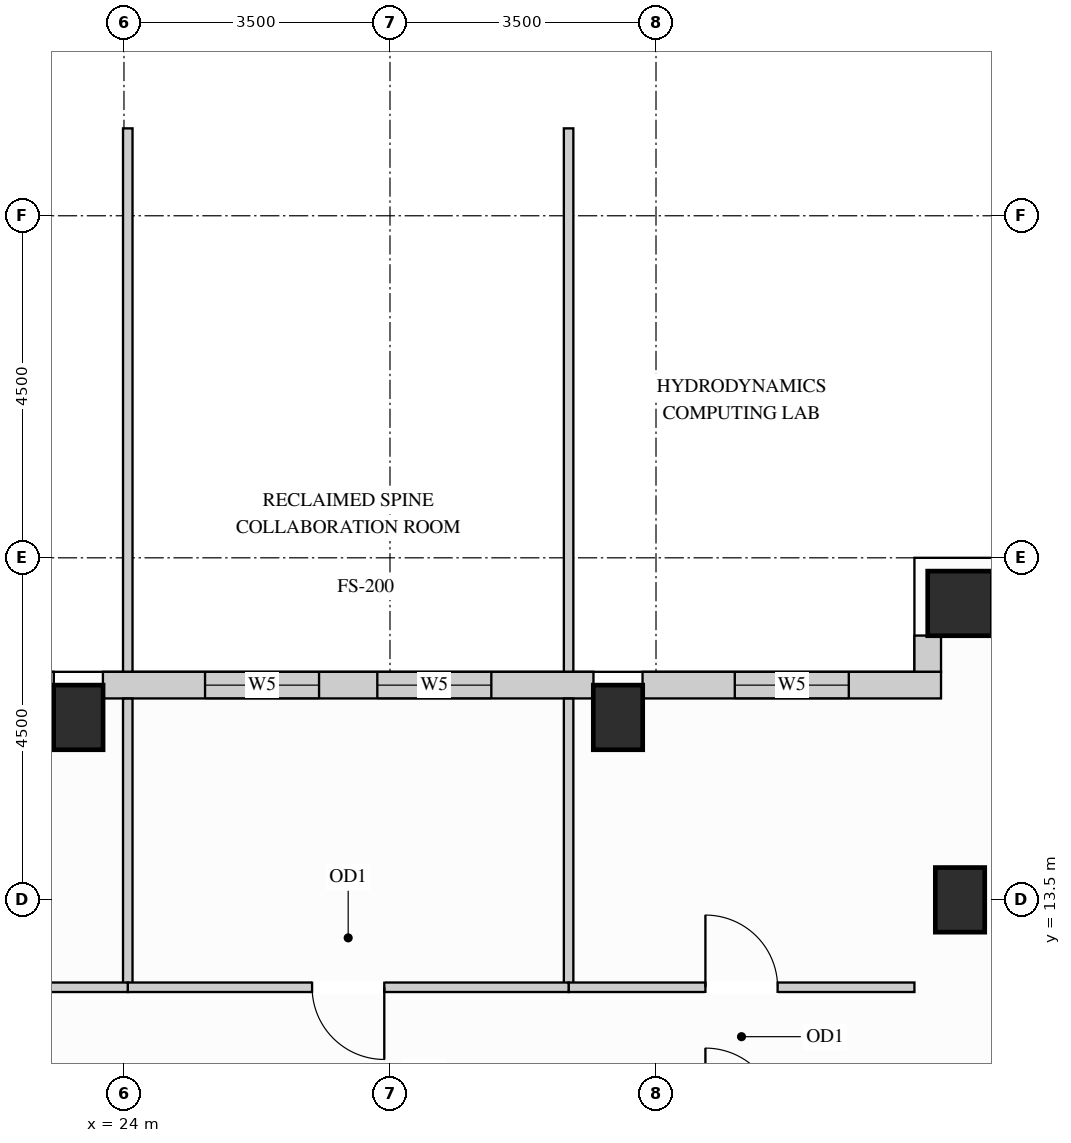
"""IFC4 building model, lengths in metres.
Left out: names, types, materials, properties, quantities, classifications, styles, units other than length and angle.
Written with IfcOpenShell. Run it as: python <this file> out.ifc"""

import sys

from ifc_helpers import new_model, si_unit, direction, frame, frame_2d, origin, origin_2d, place, context, subcontext, project, spatial, rectangle, extrude, source, transform, mapped, element, fill, save


model = new_model("IFC4")
c1 = context("Model", 3, precision=1e-05, world=origin(), true_north=direction((0.0, 1.0)))
c2 = subcontext(c1, "Body", "Model", "MODEL_VIEW")
j1 = project(units=[si_unit("LENGTHUNIT", "METRE"), si_unit("PLANEANGLEUNIT", "RADIAN")], contexts=[c1])
p1 = place(None, origin())
s1 = spatial("IfcSite", under=j1, at=p1, CompositionType="ELEMENT")
p2 = place(p1, origin())
s2 = spatial("IfcBuilding", under=s1, at=p2, CompositionType="ELEMENT")
p3 = place(p2, frame((0.0, 0.0, 230.4)))
s3 = spatial("IfcBuildingStorey", under=s2, at=p3, CompositionType="ELEMENT", Elevation=230.4)
m1 = source(origin(), c2, "Body", "SweptSolid", [
    extrude(rectangle(XDim=0.65, YDim=0.85, at=origin_2d()), origin(), (0.0, 0.0, 1.0), 3.4),
])
for number, where, z_axis, x_axis in (
    (1, (35.0, 13.5, 0.0), (0.0, 0.0, 1.0), (1.0, 0.0, 0.0)),
    (2, (23.4, 15.9, 0.0), (0.0, 0.0, 1.0), (1.0, 0.0, 0.0)),
    (3, (30.5, 15.9, 0.0), (0.0, 0.0, 1.0), (1.0, 0.0, 0.0)),
):
    element("IfcColumn", number, at=place(p3, frame(where, z_axis=z_axis, x_axis=x_axis)), inside=s3, PredefinedType="COLUMN", context=c2, shape_type="MappedRepresentation", body=[
        mapped(m1, transform((0.0, 0.0, 0.0), x_axis=(1.0, 0.0, 0.0), y_axis=(0.0, 1.0, 0.0), z_axis=(0.0, 0.0, 1.0))),
    ])
m2 = source(origin(), c2, "Body", "SweptSolid", [
    extrude(rectangle(XDim=0.85, YDim=0.85, at=origin_2d()), origin(), (0.0, 0.0, 1.0), 3.4),
])
p4 = place(p3, frame((35.0, 17.4, 0.0), z_axis=(0.0, 0.0, 1.0), x_axis=(1.0, 0.0, 0.0)))
e4 = element("IfcColumn", 4, at=p4, inside=s3, PredefinedType="COLUMN", context=c2, shape_type="MappedRepresentation", body=[
    mapped(m2, transform((0.0, 0.0, 0.0), x_axis=(1.0, 0.0, 0.0), y_axis=(0.0, 1.0, 0.0), z_axis=(0.0, 0.0, 1.0))),
])
m3 = source(origin(), c2, "Body", "SweptSolid", [
    extrude(rectangle(XDim=0.479, YDim=0.35, at=frame_2d((0.24, 0.0))), origin(), (0.0, 0.0, 1.0), 3.385),
])
p5 = place(p3, frame((34.575, 16.977, 0.0), z_axis=(0.0, 0.0, 1.0), x_axis=(0.0, -1.0, 0.0)))
e5 = element("IfcWall", 5, at=p5, inside=s3, PredefinedType="SOLIDWALL", context=c2, shape_type="MappedRepresentation", body=[
    mapped(m3, transform((0.0, 0.0, 0.0), x_axis=(1.0, 0.0, 0.0), y_axis=(0.0, 1.0, 0.0), z_axis=(0.0, 0.0, 1.0))),
])
p6 = place(p3, frame((34.75, 16.325, 0.0), z_axis=(0.0, 0.0, 1.0), x_axis=(-1.0, 0.0, 0.0)))
e6 = element("IfcWall", 6, at=p6, inside=s3, PredefinedType="SOLIDWALL", context=c2, shape_type="SweptSolid", body=[
    extrude(rectangle(XDim=3.927, YDim=0.35, at=frame_2d((1.963, 0.0))), origin(), (0.0, 0.0, 1.0), 3.385),
])
p7 = place(p6, frame((1.213, 0.0, 0.78)))
e7 = element("IfcOpeningElement", 7, at=p7, cuts=e6, PredefinedType="OPENING", context=c2, shape_type="SweptSolid", body=[
    extrude(rectangle(XDim=1.5, YDim=2.0, at=frame_2d((0.75, 1.0))), frame((0.0, 0.185, 0.0), z_axis=(0.0, -1.0, 0.0), x_axis=(1.0, 0.0, 0.0)), (0.0, 0.0, 1.0), 0.37),
])
p8 = place(p3, frame((30.177, 16.325, 0.0), z_axis=(0.0, 0.0, 1.0), x_axis=(-1.0, 0.0, 0.0)))
e8 = element("IfcWall", 8, at=p8, inside=s3, PredefinedType="SOLIDWALL", context=c2, shape_type="SweptSolid", body=[
    extrude(rectangle(XDim=6.454, YDim=0.35, at=frame_2d((3.227, 0.0))), origin(), (0.0, 0.0, 1.0), 3.385),
])
p9 = place(p8, frame((1.344, 0.0, 0.78)))
e9 = element("IfcOpeningElement", 9, at=p9, cuts=e8, PredefinedType="OPENING", context=c2, shape_type="SweptSolid", body=[
    extrude(rectangle(XDim=1.5, YDim=2.0, at=frame_2d((0.75, 1.0))), frame((0.0, 0.185, 0.0), z_axis=(0.0, -1.0, 0.0), x_axis=(1.0, 0.0, 0.0)), (0.0, 0.0, 1.0), 0.37),
])
p10 = place(p8, frame((3.61, 0.0, 0.78)))
e10 = element("IfcOpeningElement", 10, at=p10, cuts=e8, PredefinedType="OPENING", context=c2, shape_type="SweptSolid", body=[
    extrude(rectangle(XDim=1.5, YDim=2.0, at=frame_2d((0.75, 1.0))), frame((0.0, 0.185, 0.0), z_axis=(0.0, -1.0, 0.0), x_axis=(1.0, 0.0, 0.0)), (0.0, 0.0, 1.0), 0.37),
])
p11 = place(p3, frame((23.077, 16.325, 0.0), z_axis=(0.0, 0.0, 1.0), x_axis=(-1.0, 0.0, 0.0)))
e11 = element("IfcWall", 11, at=p11, inside=s3, PredefinedType="SOLIDWALL", context=c2, shape_type="SweptSolid", body=[
    extrude(rectangle(XDim=3.927, YDim=0.35, at=frame_2d((1.963, 0.0))), origin(), (0.0, 0.0, 1.0), 3.385),
])
p12 = place(p11, frame((1.213, 0.0, 0.78)))
e12 = element("IfcOpeningElement", 12, at=p12, cuts=e11, PredefinedType="OPENING", context=c2, shape_type="SweptSolid", body=[
    extrude(rectangle(XDim=1.5, YDim=2.0, at=frame_2d((0.75, 1.0))), frame((0.0, 0.185, 0.0), z_axis=(0.0, -1.0, 0.0), x_axis=(1.0, 0.0, 0.0)), (0.0, 0.0, 1.0), 0.37),
])
m4 = source(origin(), c2, "Body", "SweptSolid", [
    extrude(rectangle(XDim=3.798, YDim=0.125, at=frame_2d((1.899, 0.0))), origin(), (0.0, 0.0, 1.0), 3.385),
])
p13 = place(p3, frame((24.05, 12.35, 0.0), z_axis=(0.0, 0.0, 1.0), x_axis=(0.0, 1.0, 0.0)))
e13 = element("IfcWall", 13, at=p13, inside=s3, PredefinedType="PARTITIONING", context=c2, shape_type="MappedRepresentation", body=[
    mapped(m4, transform((0.0, 0.0, 0.0), x_axis=(1.0, 0.0, 0.0), y_axis=(0.0, 1.0, 0.0), z_axis=(0.0, 0.0, 1.0))),
])
m5 = source(origin(), c2, "Body", "SweptSolid", [
    extrude(rectangle(XDim=7.148, YDim=0.125, at=frame_2d((3.574, 0.0))), origin(), (0.0, 0.0, 1.0), 3.385),
])
p14 = place(p3, frame((24.05, 16.502, 0.0), z_axis=(0.0, 0.0, 1.0), x_axis=(0.0, 1.0, 0.0)))
e14 = element("IfcWall", 14, at=p14, inside=s3, PredefinedType="PARTITIONING", context=c2, shape_type="MappedRepresentation", body=[
    mapped(m5, transform((0.0, 0.0, 0.0), x_axis=(1.0, 0.0, 0.0), y_axis=(0.0, 1.0, 0.0), z_axis=(0.0, 0.0, 1.0))),
])
p15 = place(p3, frame((29.85, 12.35, 0.0), z_axis=(0.0, 0.0, 1.0), x_axis=(0.0, 1.0, 0.0)))
e15 = element("IfcWall", 15, at=p15, inside=s3, PredefinedType="PARTITIONING", context=c2, shape_type="MappedRepresentation", body=[
    mapped(m4, transform((0.0, 0.0, 0.0), x_axis=(1.0, 0.0, 0.0), y_axis=(0.0, 1.0, 0.0), z_axis=(0.0, 0.0, 1.0))),
])
p16 = place(p3, frame((29.85, 16.502, 0.0), z_axis=(0.0, 0.0, 1.0), x_axis=(0.0, 1.0, 0.0)))
e16 = element("IfcWall", 16, at=p16, inside=s3, PredefinedType="PARTITIONING", context=c2, shape_type="MappedRepresentation", body=[
    mapped(m5, transform((0.0, 0.0, 0.0), x_axis=(1.0, 0.0, 0.0), y_axis=(0.0, 1.0, 0.0), z_axis=(0.0, 0.0, 1.0))),
])
p17 = place(p3, frame((29.85, 12.35, 0.0), z_axis=(0.0, 0.0, 1.0), x_axis=(1.0, 0.0, 0.0)))
e17 = element("IfcWall", 17, at=p17, inside=s3, PredefinedType="PARTITIONING", context=c2, shape_type="SweptSolid", body=[
    extrude(rectangle(XDim=4.55, YDim=0.125, at=frame_2d((2.275, 0.0))), origin(), (0.0, 0.0, 1.0), 3.385),
])
p18 = place(p17, frame((1.8, 0.0, 0.0)))
e18 = element("IfcOpeningElement", 18, at=p18, cuts=e17, PredefinedType="OPENING", context=c2, shape_type="SweptSolid", body=[
    extrude(rectangle(XDim=0.95, YDim=2.15, at=frame_2d((0.475, 1.075))), frame((0.0, 0.073, 0.0), z_axis=(0.0, -1.0, 0.0), x_axis=(1.0, 0.0, 0.0)), (0.0, 0.0, 1.0), 0.145),
])
p19 = place(p3, frame((24.05, 12.35, 0.0), z_axis=(0.0, 0.0, 1.0), x_axis=(1.0, 0.0, 0.0)))
e19 = element("IfcWall", 19, at=p19, inside=s3, PredefinedType="PARTITIONING", context=c2, shape_type="SweptSolid", body=[
    extrude(rectangle(XDim=5.8, YDim=0.125, at=frame_2d((2.9, 0.0))), origin(), (0.0, 0.0, 1.0), 3.385),
])
p20 = place(p19, frame((2.425, 0.0, 0.0)))
e20 = element("IfcOpeningElement", 20, at=p20, cuts=e19, PredefinedType="OPENING", context=c2, shape_type="SweptSolid", body=[
    extrude(rectangle(XDim=0.95, YDim=2.15, at=frame_2d((0.475, 1.075))), frame((0.0, 0.073, 0.0), z_axis=(0.0, -1.0, 0.0), x_axis=(1.0, 0.0, 0.0)), (0.0, 0.0, 1.0), 0.145),
])
p21 = place(p3, frame((19.5, 12.35, 0.0), z_axis=(0.0, 0.0, 1.0), x_axis=(1.0, 0.0, 0.0)))
e21 = element("IfcWall", 21, at=p21, inside=s3, PredefinedType="PARTITIONING", context=c2, shape_type="SweptSolid", body=[
    extrude(rectangle(XDim=4.55, YDim=0.125, at=frame_2d((2.275, 0.0))), origin(), (0.0, 0.0, 1.0), 3.385),
])
p22 = place(p21, frame((1.8, 0.0, 0.0)))
e22 = element("IfcOpeningElement", 22, at=p22, cuts=e21, PredefinedType="OPENING", context=c2, shape_type="SweptSolid", body=[
    extrude(rectangle(XDim=0.95, YDim=2.15, at=frame_2d((0.475, 1.075))), frame((0.0, 0.073, 0.0), z_axis=(0.0, -1.0, 0.0), x_axis=(1.0, 0.0, 0.0)), (0.0, 0.0, 1.0), 0.145),
])
m6 = source(origin(), c2, "Body", "SweptSolid", [
    extrude(rectangle(XDim=0.95, YDim=2.15, at=frame_2d((0.475, 1.075))), frame((0.0, 0.025, 0.0), z_axis=(0.0, -1.0, 0.0), x_axis=(1.0, 0.0, 0.0)), (0.0, 0.0, 1.0), 0.05),
])
p23 = place(p20, origin())
e23 = element("IfcDoor", 23, at=p23, inside=s3, OperationType="SINGLE_SWING_RIGHT", PredefinedType="DOOR", context=c2, shape_type="MappedRepresentation", body=[
    mapped(m6, transform((0.0, 0.0, 0.0), x_axis=(1.0, 0.0, 0.0), y_axis=(0.0, 1.0, 0.0), z_axis=(0.0, 0.0, 1.0))),
])
fill(e20, e23)
p24 = place(p18, origin())
e24 = element("IfcDoor", 24, at=p24, inside=s3, OperationType="SINGLE_SWING_LEFT", PredefinedType="DOOR", context=c2, shape_type="MappedRepresentation", body=[
    mapped(m6, transform((0.0, 0.0, 0.0), x_axis=(1.0, 0.0, 0.0), y_axis=(0.0, 1.0, 0.0), z_axis=(0.0, 0.0, 1.0))),
])
fill(e18, e24)
m7 = source(origin(), c2, "Body", "SweptSolid", [
    extrude(rectangle(XDim=1.5, YDim=2.0, at=frame_2d((0.75, 1.0))), frame((0.0, 0.03, 0.0), z_axis=(0.0, -1.0, 0.0), x_axis=(1.0, 0.0, 0.0)), (0.0, 0.0, 1.0), 0.06),
])
p25 = place(p7, origin())
e25 = element("IfcWindow", 25, at=p25, inside=s3, PartitioningType="SINGLE_PANEL", PredefinedType="WINDOW", context=c2, shape_type="MappedRepresentation", body=[
    mapped(m7, transform((0.0, 0.0, 0.0), x_axis=(1.0, 0.0, 0.0), y_axis=(0.0, 1.0, 0.0), z_axis=(0.0, 0.0, 1.0))),
])
fill(e7, e25)
p26 = place(p9, origin())
e26 = element("IfcWindow", 26, at=p26, inside=s3, PartitioningType="SINGLE_PANEL", PredefinedType="WINDOW", context=c2, shape_type="MappedRepresentation", body=[
    mapped(m7, transform((0.0, 0.0, 0.0), x_axis=(1.0, 0.0, 0.0), y_axis=(0.0, 1.0, 0.0), z_axis=(0.0, 0.0, 1.0))),
])
fill(e9, e26)
p27 = place(p10, origin())
e27 = element("IfcWindow", 27, at=p27, inside=s3, PartitioningType="SINGLE_PANEL", PredefinedType="WINDOW", context=c2, shape_type="MappedRepresentation", body=[
    mapped(m7, transform((0.0, 0.0, 0.0), x_axis=(1.0, 0.0, 0.0), y_axis=(0.0, 1.0, 0.0), z_axis=(0.0, 0.0, 1.0))),
])
fill(e10, e27)
save(model, sys.argv[1])
